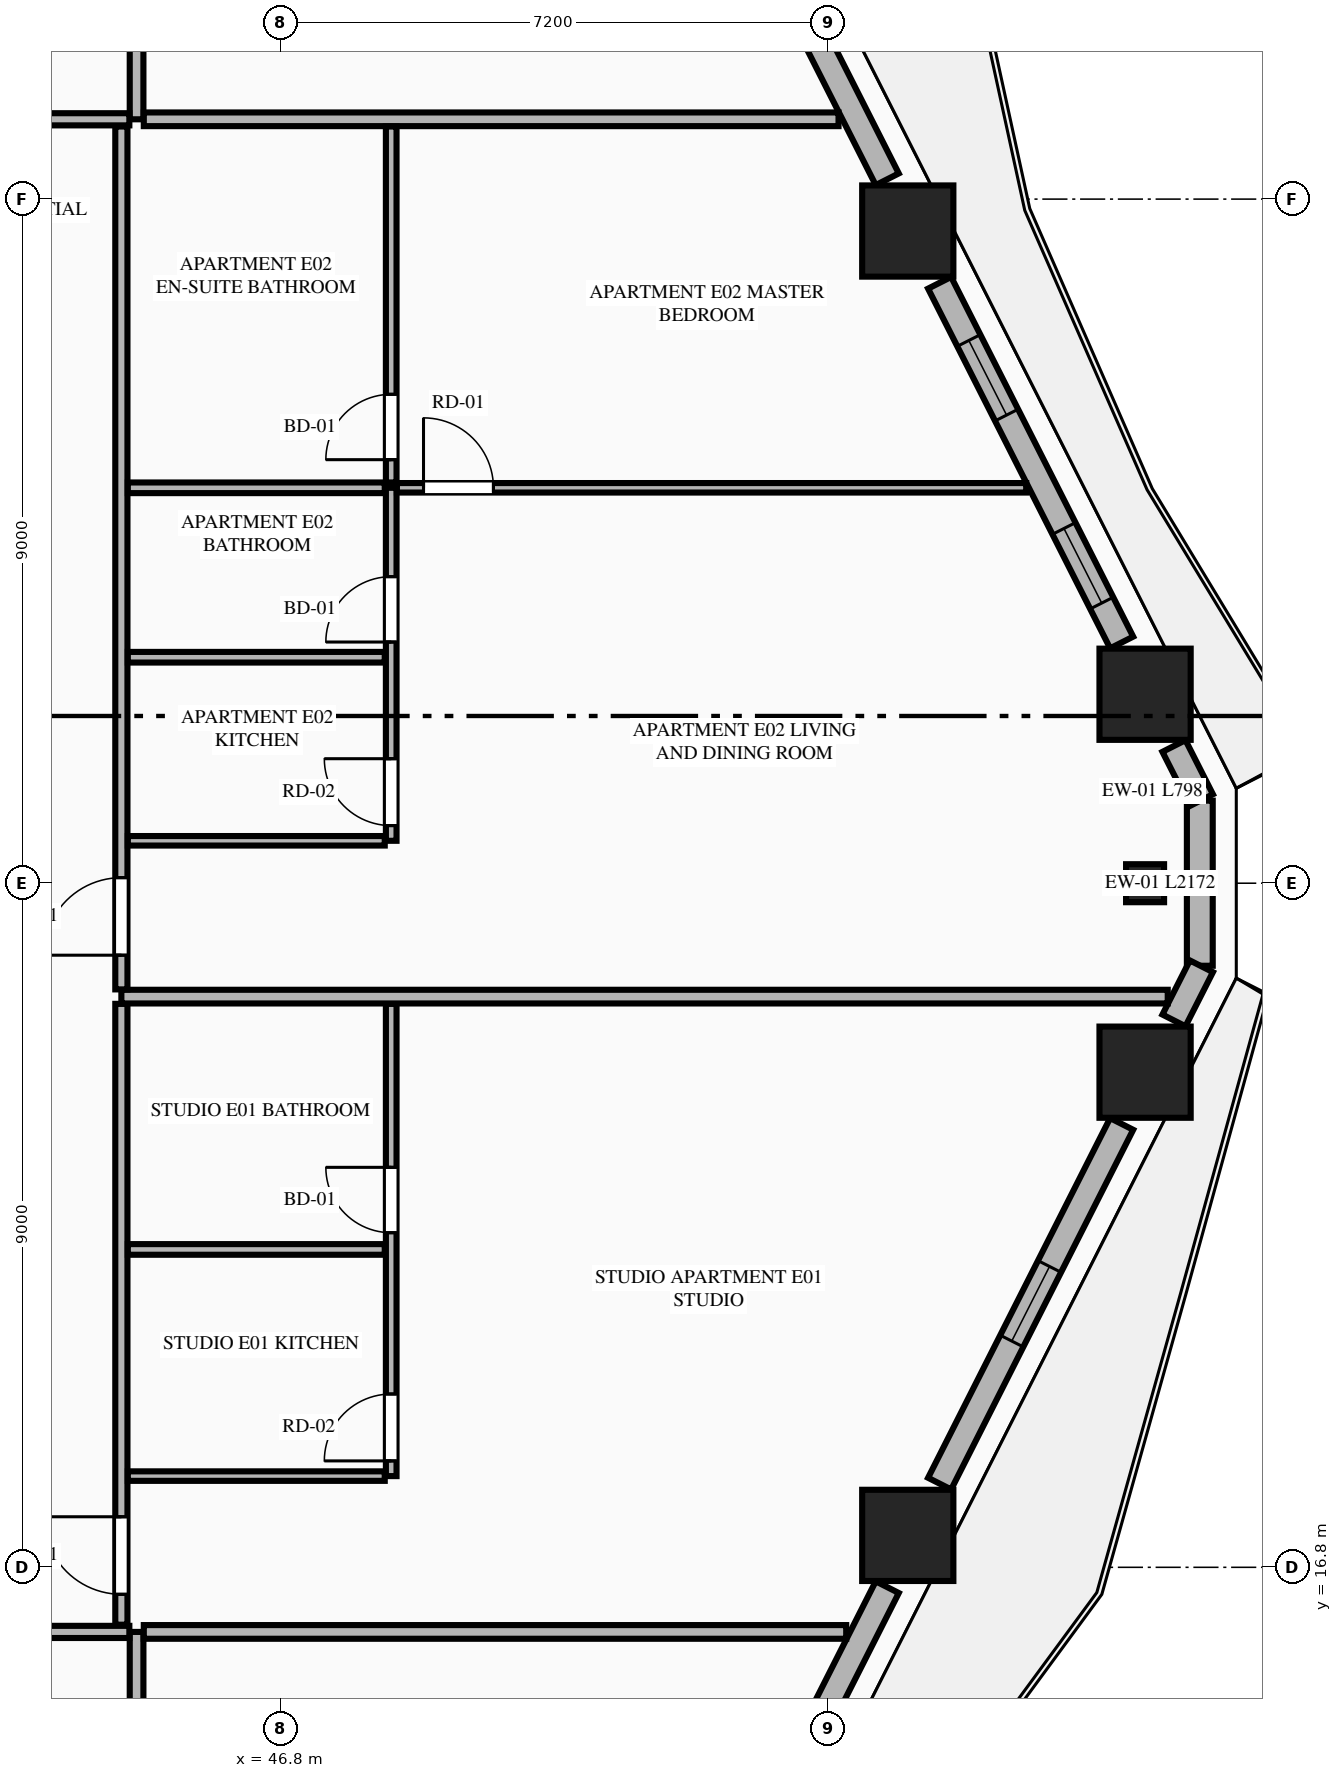
"""IFC4 building model, lengths in metres.
Left out: names, types, materials, properties, quantities, classifications, styles, units other than length and angle.
Written with IfcOpenShell. Run it as: python <this file> out.ifc"""

import sys

from ifc_helpers import new_model, si_unit, direction, frame, frame_2d, origin, origin_2d, place, context, subcontext, project, spatial, rectangle, extrude, element, fill, save


model = new_model("IFC4")
c1 = context("Model", 3, precision=1e-05, world=origin(), true_north=direction((0.0, 1.0)))
c2 = subcontext(c1, "Body", "Model", "MODEL_VIEW")
j1 = project(units=[si_unit("LENGTHUNIT", "METRE"), si_unit("PLANEANGLEUNIT", "RADIAN")], contexts=[c1])
p1 = place(None, origin())
s1 = spatial("IfcSite", under=j1, at=p1, CompositionType="ELEMENT")
p2 = place(p1, origin())
s2 = spatial("IfcBuilding", under=s1, at=p2, CompositionType="ELEMENT")
p3 = place(p2, frame((0.0, 0.0, 39.1)))
s3 = spatial("IfcBuildingStorey", under=s2, at=p3, CompositionType="ELEMENT", Elevation=39.1)
for number, where, z_axis, x_axis in (
    (1, (55.046, 17.22, 0.0), (0.0, 0.0, 1.0), (1.0, 0.0, 0.0)),
    (2, (58.168, 23.314, 0.0), (0.0, 0.0, 1.0), (1.0, 0.0, 0.0)),
    (3, (58.168, 28.286, 0.0), (0.0, 0.0, 1.0), (1.0, 0.0, 0.0)),
    (4, (55.046, 34.38, 0.0), (0.0, 0.0, 1.0), (1.0, 0.0, 0.0)),
):
    element("IfcColumn", number, at=place(p3, frame(where, z_axis=z_axis, x_axis=x_axis)), inside=s3, PredefinedType="COLUMN", context=c2, shape_type="SweptSolid", body=[
        extrude(rectangle(XDim=1.2, YDim=1.2, at=origin_2d()), origin(), (0.0, 0.0, 1.0), 3.55),
    ])
p4 = place(p3, frame((58.168, 25.8, 0.0), z_axis=(0.0, 0.0, 1.0), x_axis=(0.0, 1.0, 0.0)))
e5 = element("IfcColumn", 5, at=p4, inside=s3, PredefinedType="PILASTER", context=c2, shape_type="SweptSolid", body=[
    extrude(rectangle(XDim=0.5, YDim=0.35, at=origin_2d()), origin(), (0.0, 0.0, 1.0), 3.55),
])
p5 = place(p3, frame((58.888, 24.714, 0.0), z_axis=(0.0, 0.0, 1.0), x_axis=(0.0, 1.0, 0.0)))
e6 = element("IfcWall", 6, at=p5, inside=s3, PredefinedType="STANDARD", context=c2, shape_type="SweptSolid", body=[
    extrude(rectangle(XDim=2.172, YDim=0.34, at=frame_2d((1.086, 0.0))), origin(), (0.0, 0.0, 1.0), 3.33),
])
p6 = place(p3, frame((52.271, 11.59, 0.0), z_axis=(0.0, 0.0, 1.0), x_axis=(0.451592100298, 0.892224509273, 0.0)))
e7 = element("IfcWall", 7, at=p6, inside=s3, PredefinedType="STANDARD", context=c2, shape_type="SweptSolid", body=[
    extrude(rectangle(XDim=5.547, YDim=0.34, at=frame_2d((2.773, 0.0))), origin(), (0.0, 0.0, 1.0), 2.787),
])
p7 = place(p6, frame((1.768, 0.0, 0.0)))
e8 = element("IfcOpeningElement", 8, at=p7, cuts=e7, PredefinedType="OPENING", context=c2, shape_type="SweptSolid", body=[
    extrude(rectangle(XDim=1.1, YDim=2.25, at=frame_2d((0.55, 1.125))), frame((0.0, 0.18, 0.0), z_axis=(0.0, -1.0, 0.0), x_axis=(1.0, 0.0, 0.0)), (0.0, 0.0, 1.0), 0.36),
])
p8 = place(p3, frame((55.465, 17.901, 0.0), z_axis=(0.0, 0.0, 1.0), x_axis=(0.451572088722, 0.892234637686, 0.0)))
e9 = element("IfcWall", 9, at=p8, inside=s3, PredefinedType="STANDARD", context=c2, shape_type="SweptSolid", body=[
    extrude(rectangle(XDim=5.304, YDim=0.34, at=frame_2d((2.652, 0.0))), origin(), (0.0, 0.0, 1.0), 2.787),
])
p9 = place(p8, frame((2.102, 0.0, 0.75)))
e10 = element("IfcOpeningElement", 10, at=p9, cuts=e9, PredefinedType="OPENING", context=c2, shape_type="SweptSolid", body=[
    extrude(rectangle(XDim=1.1, YDim=1.887, at=frame_2d((0.55, 0.943))), frame((0.0, 0.18, 0.0), z_axis=(0.0, -1.0, 0.0), x_axis=(1.0, 0.0, 0.0)), (0.0, 0.0, 1.0), 0.36),
])
for number, where, z_axis, x_axis in (
    (11, (58.548, 23.995, 0.0), (0.0, 0.0, 1.0), (0.452, 0.892, 0.0)),
    (12, (58.909, 26.893, 0.0), (0.0, 0.0, 1.0), (-0.452, 0.892, 0.0)),
):
    element("IfcWall", number, at=place(p3, frame(where, z_axis=z_axis, x_axis=x_axis)), inside=s3, PredefinedType="STANDARD", context=c2, shape_type="SweptSolid", body=[
        extrude(rectangle(XDim=0.798, YDim=0.34, at=frame_2d((0.399, 0.0))), origin(), (0.0, 0.0, 1.0), 3.33),
    ])
p10 = place(p3, frame((57.86, 28.967, 0.0), z_axis=(0.0, 0.0, 1.0), x_axis=(-0.451590635984, 0.892225250422, 0.0)))
e13 = element("IfcWall", 13, at=p10, inside=s3, PredefinedType="STANDARD", context=c2, shape_type="SweptSolid", body=[
    extrude(rectangle(XDim=5.303, YDim=0.34, at=frame_2d((2.652, 0.0))), origin(), (0.0, 0.0, 1.0), 2.787),
])
p11 = place(p10, frame((0.581, 0.0, 0.75)))
e14 = element("IfcOpeningElement", 14, at=p11, cuts=e13, PredefinedType="OPENING", context=c2, shape_type="SweptSolid", body=[
    extrude(rectangle(XDim=1.1, YDim=1.887, at=frame_2d((0.55, 0.943))), frame((0.0, 0.18, 0.0), z_axis=(0.0, -1.0, 0.0), x_axis=(1.0, 0.0, 0.0)), (0.0, 0.0, 1.0), 0.36),
])
p12 = place(p10, frame((3.353, 0.0, 0.75)))
e15 = element("IfcOpeningElement", 15, at=p12, cuts=e13, PredefinedType="OPENING", context=c2, shape_type="SweptSolid", body=[
    extrude(rectangle(XDim=1.1, YDim=1.887, at=frame_2d((0.55, 0.943))), frame((0.0, 0.18, 0.0), z_axis=(0.0, -1.0, 0.0), x_axis=(1.0, 0.0, 0.0)), (0.0, 0.0, 1.0), 0.36),
])
p13 = place(p3, frame((54.776, 35.061, 0.0), z_axis=(0.0, 0.0, 1.0), x_axis=(-0.451592100298, 0.892224509273, 0.0)))
e16 = element("IfcWall", 16, at=p13, inside=s3, PredefinedType="STANDARD", context=c2, shape_type="SweptSolid", body=[
    extrude(rectangle(XDim=5.547, YDim=0.34, at=frame_2d((2.773, 0.0))), origin(), (0.0, 0.0, 1.0), 2.787),
])
p14 = place(p13, frame((2.791, 0.0, 0.0)))
e17 = element("IfcOpeningElement", 17, at=p14, cuts=e16, PredefinedType="OPENING", context=c2, shape_type="SweptSolid", body=[
    extrude(rectangle(XDim=1.1, YDim=2.25, at=frame_2d((0.55, 1.125))), frame((0.0, 0.18, 0.0), z_axis=(0.0, -1.0, 0.0), x_axis=(1.0, 0.0, 0.0)), (0.0, 0.0, 1.0), 0.36),
])
p15 = place(p3, frame((44.9, 2.455, 0.0), z_axis=(0.0, 0.0, 1.0), x_axis=(0.0, 1.0, 0.0)))
e18 = element("IfcWall", 18, at=p15, inside=s3, PredefinedType="PARTITIONING", context=c2, shape_type="SweptSolid", body=[
    extrude(rectangle(XDim=13.495, YDim=0.18, at=frame_2d((6.748, 0.0))), origin(), (0.0, 0.0, 1.0), 3.33),
])
p16 = place(p3, frame((36.617, 15.95, 0.0), z_axis=(0.0, 0.0, 1.0), x_axis=(1.0, 0.0, 0.0)))
e19 = element("IfcWall", 19, at=p16, inside=s3, PredefinedType="PARTITIONING", context=c2, shape_type="SweptSolid", body=[
    extrude(rectangle(XDim=8.188, YDim=0.16, at=frame_2d((4.094, 0.0))), origin(), (0.0, 0.0, 1.0), 3.33),
])
p17 = place(p16, frame((0.355, 0.0, 0.0)))
e20 = element("IfcOpeningElement", 20, at=p17, cuts=e19, PredefinedType="OPENING", context=c2, shape_type="SweptSolid", body=[
    extrude(rectangle(XDim=1.02, YDim=2.25, at=frame_2d((0.51, 1.125))), frame((0.0, 0.09, 0.0), z_axis=(0.0, -1.0, 0.0), x_axis=(1.0, 0.0, 0.0)), (0.0, 0.0, 1.0), 0.18),
])
p18 = place(p3, frame((44.9, 35.85, 0.0), z_axis=(0.0, 0.0, 1.0), x_axis=(0.0, 1.0, 0.0)))
e21 = element("IfcWall", 21, at=p18, inside=s3, PredefinedType="PARTITIONING", context=c2, shape_type="SweptSolid", body=[
    extrude(rectangle(XDim=13.295, YDim=0.18, at=frame_2d((6.647, 0.0))), origin(), (0.0, 0.0, 1.0), 3.33),
])
p19 = place(p3, frame((19.995, 35.85, 0.0), z_axis=(0.0, 0.0, 1.0), x_axis=(1.0, 0.0, 0.0)))
e22 = element("IfcWall", 22, at=p19, inside=s3, PredefinedType="PARTITIONING", context=c2, shape_type="SweptSolid", body=[
    extrude(rectangle(XDim=24.81, YDim=0.16, at=frame_2d((12.405, 0.0))), origin(), (0.0, 0.0, 1.0), 3.33),
])
p20 = place(p19, frame((0.705, 0.0, 0.0)))
e23 = element("IfcOpeningElement", 23, at=p20, cuts=e22, PredefinedType="OPENING", context=c2, shape_type="SweptSolid", body=[
    extrude(rectangle(XDim=1.35, YDim=2.35, at=frame_2d((0.675, 1.175))), frame((0.0, 0.09, 0.0), z_axis=(0.0, -1.0, 0.0), x_axis=(1.0, 0.0, 0.0)), (0.0, 0.0, 1.0), 0.18),
])
p21 = place(p3, frame((44.995, 15.95, 0.0), z_axis=(0.0, 0.0, 1.0), x_axis=(1.0, 0.0, 0.0)))
e24 = element("IfcWall", 24, at=p21, inside=s3, PredefinedType="PARTITIONING", context=c2, shape_type="SweptSolid", body=[
    extrude(rectangle(XDim=9.241, YDim=0.18, at=frame_2d((4.621, 0.0))), origin(), (0.0, 0.0, 1.0), 3.33),
])
p22 = place(p3, frame((44.995, 35.85, 0.0), z_axis=(0.0, 0.0, 1.0), x_axis=(1.0, 0.0, 0.0)))
e25 = element("IfcWall", 25, at=p22, inside=s3, PredefinedType="PARTITIONING", context=c2, shape_type="SweptSolid", body=[
    extrude(rectangle(XDim=9.14, YDim=0.18, at=frame_2d((4.57, 0.0))), origin(), (0.0, 0.0, 1.0), 3.33),
])
p23 = place(p3, frame((44.7, 16.045, 0.0), z_axis=(0.0, 0.0, 1.0), x_axis=(0.0, 1.0, 0.0)))
e26 = element("IfcWall", 26, at=p23, inside=s3, PredefinedType="PARTITIONING", context=c2, shape_type="SweptSolid", body=[
    extrude(rectangle(XDim=8.168, YDim=0.16, at=frame_2d((4.084, 0.0))), origin(), (0.0, 0.0, 1.0), 3.33),
])
p24 = place(p23, frame((0.4, 0.0, 0.0)))
e27 = element("IfcOpeningElement", 27, at=p24, cuts=e26, PredefinedType="OPENING", context=c2, shape_type="SweptSolid", body=[
    extrude(rectangle(XDim=1.02, YDim=2.25, at=frame_2d((0.51, 1.125))), frame((0.0, 0.09, 0.0), z_axis=(0.0, -1.0, 0.0), x_axis=(1.0, 0.0, 0.0)), (0.0, 0.0, 1.0), 0.18),
])
p25 = place(p3, frame((44.785, 18.0, 0.0), z_axis=(0.0, 0.0, 1.0), x_axis=(1.0, 0.0, 0.0)))
e28 = element("IfcWall", 28, at=p25, inside=s3, PredefinedType="PARTITIONING", context=c2, shape_type="SweptSolid", body=[
    extrude(rectangle(XDim=3.38, YDim=0.125, at=frame_2d((1.69, 0.0))), origin(), (0.0, 0.0, 1.0), 2.636),
])
p26 = place(p3, frame((48.25, 18.0, 0.0), z_axis=(0.0, 0.0, 1.0), x_axis=(0.0, 1.0, 0.0)))
e29 = element("IfcWall", 29, at=p26, inside=s3, PredefinedType="PLUMBINGWALL", context=c2, shape_type="SweptSolid", body=[
    extrude(rectangle(XDim=6.213, YDim=0.14, at=frame_2d((3.106, 0.0))), origin(), (0.0, 0.0, 1.0), 3.33),
])
p27 = place(p26, frame((3.202, 0.0, 0.0)))
e30 = element("IfcOpeningElement", 30, at=p27, cuts=e29, PredefinedType="OPENING", context=c2, shape_type="SweptSolid", body=[
    extrude(rectangle(XDim=0.86, YDim=2.1, at=frame_2d((0.43, 1.05))), frame((0.0, 0.08, 0.0), z_axis=(0.0, -1.0, 0.0), x_axis=(1.0, 0.0, 0.0)), (0.0, 0.0, 1.0), 0.16),
])
p28 = place(p26, frame((0.2, 0.0, 0.0)))
e31 = element("IfcOpeningElement", 31, at=p28, cuts=e29, PredefinedType="OPENING", context=c2, shape_type="SweptSolid", body=[
    extrude(rectangle(XDim=0.88, YDim=2.15, at=frame_2d((0.44, 1.075))), frame((0.0, 0.08, 0.0), z_axis=(0.0, -1.0, 0.0), x_axis=(1.0, 0.0, 0.0)), (0.0, 0.0, 1.0), 0.16),
])
p29 = place(p3, frame((44.785, 20.982, 0.0), z_axis=(0.0, 0.0, 1.0), x_axis=(1.0, 0.0, 0.0)))
e32 = element("IfcWall", 32, at=p29, inside=s3, PredefinedType="PLUMBINGWALL", context=c2, shape_type="SweptSolid", body=[
    extrude(rectangle(XDim=3.38, YDim=0.14, at=frame_2d((1.69, 0.0))), origin(), (0.0, 0.0, 1.0), 3.33),
])
p30 = place(p3, frame((44.7, 24.308, 0.0), z_axis=(0.0, 0.0, 1.0), x_axis=(1.0, 0.0, 0.0)))
e33 = element("IfcWall", 33, at=p30, inside=s3, PredefinedType="PARTITIONING", context=c2, shape_type="SweptSolid", body=[
    extrude(rectangle(XDim=13.766, YDim=0.18, at=frame_2d((6.883, 0.0))), origin(), (0.0, 0.0, 1.0), 3.33),
])
p31 = place(p3, frame((44.7, 24.403, 0.0), z_axis=(0.0, 0.0, 1.0), x_axis=(0.0, 1.0, 0.0)))
e34 = element("IfcWall", 34, at=p31, inside=s3, PredefinedType="PARTITIONING", context=c2, shape_type="SweptSolid", body=[
    extrude(rectangle(XDim=11.352, YDim=0.16, at=frame_2d((5.676, 0.0))), origin(), (0.0, 0.0, 1.0), 3.33),
])
p32 = place(p31, frame((0.45, 0.0, 0.0)))
e35 = element("IfcOpeningElement", 35, at=p32, cuts=e34, PredefinedType="OPENING", context=c2, shape_type="SweptSolid", body=[
    extrude(rectangle(XDim=1.02, YDim=2.25, at=frame_2d((0.51, 1.125))), frame((0.0, 0.09, 0.0), z_axis=(0.0, -1.0, 0.0), x_axis=(1.0, 0.0, 0.0)), (0.0, 0.0, 1.0), 0.18),
])
p33 = place(p3, frame((44.785, 26.358, 0.0), z_axis=(0.0, 0.0, 1.0), x_axis=(1.0, 0.0, 0.0)))
e36 = element("IfcWall", 36, at=p33, inside=s3, PredefinedType="PARTITIONING", context=c2, shape_type="SweptSolid", body=[
    extrude(rectangle(XDim=3.38, YDim=0.125, at=frame_2d((1.69, 0.0))), origin(), (0.0, 0.0, 1.0), 3.33),
])
p34 = place(p3, frame((48.25, 26.358, 0.0), z_axis=(0.0, 0.0, 1.0), x_axis=(0.0, 1.0, 0.0)))
e37 = element("IfcWall", 37, at=p34, inside=s3, PredefinedType="PLUMBINGWALL", context=c2, shape_type="SweptSolid", body=[
    extrude(rectangle(XDim=4.644, YDim=0.14, at=frame_2d((2.322, 0.0))), origin(), (0.0, 0.0, 1.0), 3.33),
])
p35 = place(p34, frame((0.2, 0.0, 0.0)))
e38 = element("IfcOpeningElement", 38, at=p35, cuts=e37, PredefinedType="OPENING", context=c2, shape_type="SweptSolid", body=[
    extrude(rectangle(XDim=0.88, YDim=2.15, at=frame_2d((0.44, 1.075))), frame((0.0, 0.08, 0.0), z_axis=(0.0, -1.0, 0.0), x_axis=(1.0, 0.0, 0.0)), (0.0, 0.0, 1.0), 0.16),
])
p36 = place(p34, frame((2.615, 0.0, 0.0)))
e39 = element("IfcOpeningElement", 39, at=p36, cuts=e37, PredefinedType="OPENING", context=c2, shape_type="SweptSolid", body=[
    extrude(rectangle(XDim=0.86, YDim=2.1, at=frame_2d((0.43, 1.05))), frame((0.0, 0.08, 0.0), z_axis=(0.0, -1.0, 0.0), x_axis=(1.0, 0.0, 0.0)), (0.0, 0.0, 1.0), 0.16),
])
p37 = place(p3, frame((48.25, 31.072, 0.0), z_axis=(0.0, 0.0, 1.0), x_axis=(0.0, 1.0, 0.0)))
e40 = element("IfcWall", 40, at=p37, inside=s3, PredefinedType="PLUMBINGWALL", context=c2, shape_type="SweptSolid", body=[
    extrude(rectangle(XDim=4.683, YDim=0.14, at=frame_2d((2.341, 0.0))), origin(), (0.0, 0.0, 1.0), 3.33),
])
p38 = place(p37, frame((0.3, 0.0, 0.0)))
e41 = element("IfcOpeningElement", 41, at=p38, cuts=e40, PredefinedType="OPENING", context=c2, shape_type="SweptSolid", body=[
    extrude(rectangle(XDim=0.86, YDim=2.1, at=frame_2d((0.43, 1.05))), frame((0.0, 0.08, 0.0), z_axis=(0.0, -1.0, 0.0), x_axis=(1.0, 0.0, 0.0)), (0.0, 0.0, 1.0), 0.16),
])
p39 = place(p3, frame((44.785, 31.002, 0.0), z_axis=(0.0, 0.0, 1.0), x_axis=(1.0, 0.0, 0.0)))
e42 = element("IfcWall", 42, at=p39, inside=s3, PredefinedType="PLUMBINGWALL", context=c2, shape_type="SweptSolid", body=[
    extrude(rectangle(XDim=3.38, YDim=0.14, at=frame_2d((1.69, 0.0))), origin(), (0.0, 0.0, 1.0), 3.33),
])
p40 = place(p3, frame((48.325, 31.002, 0.0), z_axis=(0.0, 0.0, 1.0), x_axis=(1.0, 0.0, 0.0)))
e43 = element("IfcWall", 43, at=p40, inside=s3, PredefinedType="PARTITIONING", context=c2, shape_type="SweptSolid", body=[
    extrude(rectangle(XDim=8.279, YDim=0.125, at=frame_2d((4.14, 0.0))), origin(), (0.0, 0.0, 1.0), 3.33),
])
p41 = place(p40, frame((0.35, 0.0, 0.0)))
e44 = element("IfcOpeningElement", 44, at=p41, cuts=e43, PredefinedType="OPENING", context=c2, shape_type="SweptSolid", body=[
    extrude(rectangle(XDim=0.92, YDim=2.15, at=frame_2d((0.46, 1.075))), frame((0.0, 0.073, 0.0), z_axis=(0.0, -1.0, 0.0), x_axis=(1.0, 0.0, 0.0)), (0.0, 0.0, 1.0), 0.145),
])
p42 = place(p3, frame((44.785, 28.773, 0.0), z_axis=(0.0, 0.0, 1.0), x_axis=(1.0, 0.0, 0.0)))
e45 = element("IfcWall", 45, at=p42, inside=s3, PredefinedType="PLUMBINGWALL", context=c2, shape_type="SweptSolid", body=[
    extrude(rectangle(XDim=3.38, YDim=0.14, at=frame_2d((1.69, 0.0))), origin(), (0.0, 0.0, 1.0), 3.33),
])
p43 = place(p9, origin())
e46 = element("IfcWindow", 46, at=p43, inside=s3, PartitioningType="SINGLE_PANEL", PredefinedType="WINDOW", context=c2, shape_type="SweptSolid", body=[
    extrude(rectangle(XDim=1.1, YDim=1.887, at=frame_2d((0.55, 0.943))), frame((0.0, 0.03, 0.0), z_axis=(0.0, -1.0, 0.0), x_axis=(1.0, 0.0, 0.0)), (0.0, 0.0, 1.0), 0.06),
])
fill(e10, e46)
p44 = place(p11, origin())
e47 = element("IfcWindow", 47, at=p44, inside=s3, PartitioningType="SINGLE_PANEL", PredefinedType="WINDOW", context=c2, shape_type="SweptSolid", body=[
    extrude(rectangle(XDim=1.1, YDim=1.887, at=frame_2d((0.55, 0.943))), frame((0.0, 0.03, 0.0), z_axis=(0.0, -1.0, 0.0), x_axis=(1.0, 0.0, 0.0)), (0.0, 0.0, 1.0), 0.06),
])
fill(e14, e47)
p45 = place(p27, origin())
e48 = element("IfcDoor", 48, at=p45, inside=s3, OperationType="SINGLE_SWING_RIGHT", PredefinedType="DOOR", context=c2, shape_type="SweptSolid", body=[
    extrude(rectangle(XDim=0.86, YDim=2.1, at=frame_2d((0.43, 1.05))), frame((0.0, 0.025, 0.0), z_axis=(0.0, -1.0, 0.0), x_axis=(1.0, 0.0, 0.0)), (0.0, 0.0, 1.0), 0.05),
])
fill(e30, e48)
p46 = place(p24, origin())
e49 = element("IfcDoor", 49, at=p46, inside=s3, OperationType="SINGLE_SWING_RIGHT", PredefinedType="DOOR", context=c2, shape_type="SweptSolid", body=[
    extrude(rectangle(XDim=1.02, YDim=2.25, at=frame_2d((0.51, 1.125))), frame((0.0, 0.025, 0.0), z_axis=(0.0, -1.0, 0.0), x_axis=(1.0, 0.0, 0.0)), (0.0, 0.0, 1.0), 0.05),
])
fill(e27, e49)
p47 = place(p28, origin())
e50 = element("IfcDoor", 50, at=p47, inside=s3, OperationType="SINGLE_SWING_LEFT", PredefinedType="DOOR", context=c2, shape_type="SweptSolid", body=[
    extrude(rectangle(XDim=0.88, YDim=2.15, at=frame_2d((0.44, 1.075))), frame((0.0, 0.025, 0.0), z_axis=(0.0, -1.0, 0.0), x_axis=(1.0, 0.0, 0.0)), (0.0, 0.0, 1.0), 0.05),
])
fill(e31, e50)
p48 = place(p35, origin())
e51 = element("IfcDoor", 51, at=p48, inside=s3, OperationType="SINGLE_SWING_RIGHT", PredefinedType="DOOR", context=c2, shape_type="SweptSolid", body=[
    extrude(rectangle(XDim=0.88, YDim=2.15, at=frame_2d((0.44, 1.075))), frame((0.0, 0.025, 0.0), z_axis=(0.0, -1.0, 0.0), x_axis=(1.0, 0.0, 0.0)), (0.0, 0.0, 1.0), 0.05),
])
fill(e38, e51)
p49 = place(p36, origin())
e52 = element("IfcDoor", 52, at=p49, inside=s3, OperationType="SINGLE_SWING_LEFT", PredefinedType="DOOR", context=c2, shape_type="SweptSolid", body=[
    extrude(rectangle(XDim=0.86, YDim=2.1, at=frame_2d((0.43, 1.05))), frame((0.0, 0.025, 0.0), z_axis=(0.0, -1.0, 0.0), x_axis=(1.0, 0.0, 0.0)), (0.0, 0.0, 1.0), 0.05),
])
fill(e39, e52)
p50 = place(p38, origin())
e53 = element("IfcDoor", 53, at=p50, inside=s3, OperationType="SINGLE_SWING_LEFT", PredefinedType="DOOR", context=c2, shape_type="SweptSolid", body=[
    extrude(rectangle(XDim=0.86, YDim=2.1, at=frame_2d((0.43, 1.05))), frame((0.0, 0.025, 0.0), z_axis=(0.0, -1.0, 0.0), x_axis=(1.0, 0.0, 0.0)), (0.0, 0.0, 1.0), 0.05),
])
fill(e41, e53)
p51 = place(p32, origin())
e54 = element("IfcDoor", 54, at=p51, inside=s3, OperationType="SINGLE_SWING_LEFT", PredefinedType="DOOR", context=c2, shape_type="SweptSolid", body=[
    extrude(rectangle(XDim=1.02, YDim=2.25, at=frame_2d((0.51, 1.125))), frame((0.0, 0.025, 0.0), z_axis=(0.0, -1.0, 0.0), x_axis=(1.0, 0.0, 0.0)), (0.0, 0.0, 1.0), 0.05),
])
fill(e35, e54)
p52 = place(p41, origin())
e55 = element("IfcDoor", 55, at=p52, inside=s3, OperationType="SINGLE_SWING_LEFT", PredefinedType="DOOR", context=c2, shape_type="SweptSolid", body=[
    extrude(rectangle(XDim=0.92, YDim=2.15, at=frame_2d((0.46, 1.075))), frame((0.0, 0.025, 0.0), z_axis=(0.0, -1.0, 0.0), x_axis=(1.0, 0.0, 0.0)), (0.0, 0.0, 1.0), 0.05),
])
fill(e44, e55)
p53 = place(p12, origin())
e56 = element("IfcWindow", 56, at=p53, inside=s3, PartitioningType="SINGLE_PANEL", PredefinedType="WINDOW", context=c2, shape_type="SweptSolid", body=[
    extrude(rectangle(XDim=1.1, YDim=1.887, at=frame_2d((0.55, 0.943))), frame((0.0, 0.03, 0.0), z_axis=(0.0, -1.0, 0.0), x_axis=(1.0, 0.0, 0.0)), (0.0, 0.0, 1.0), 0.06),
])
fill(e15, e56)
save(model, sys.argv[1])
